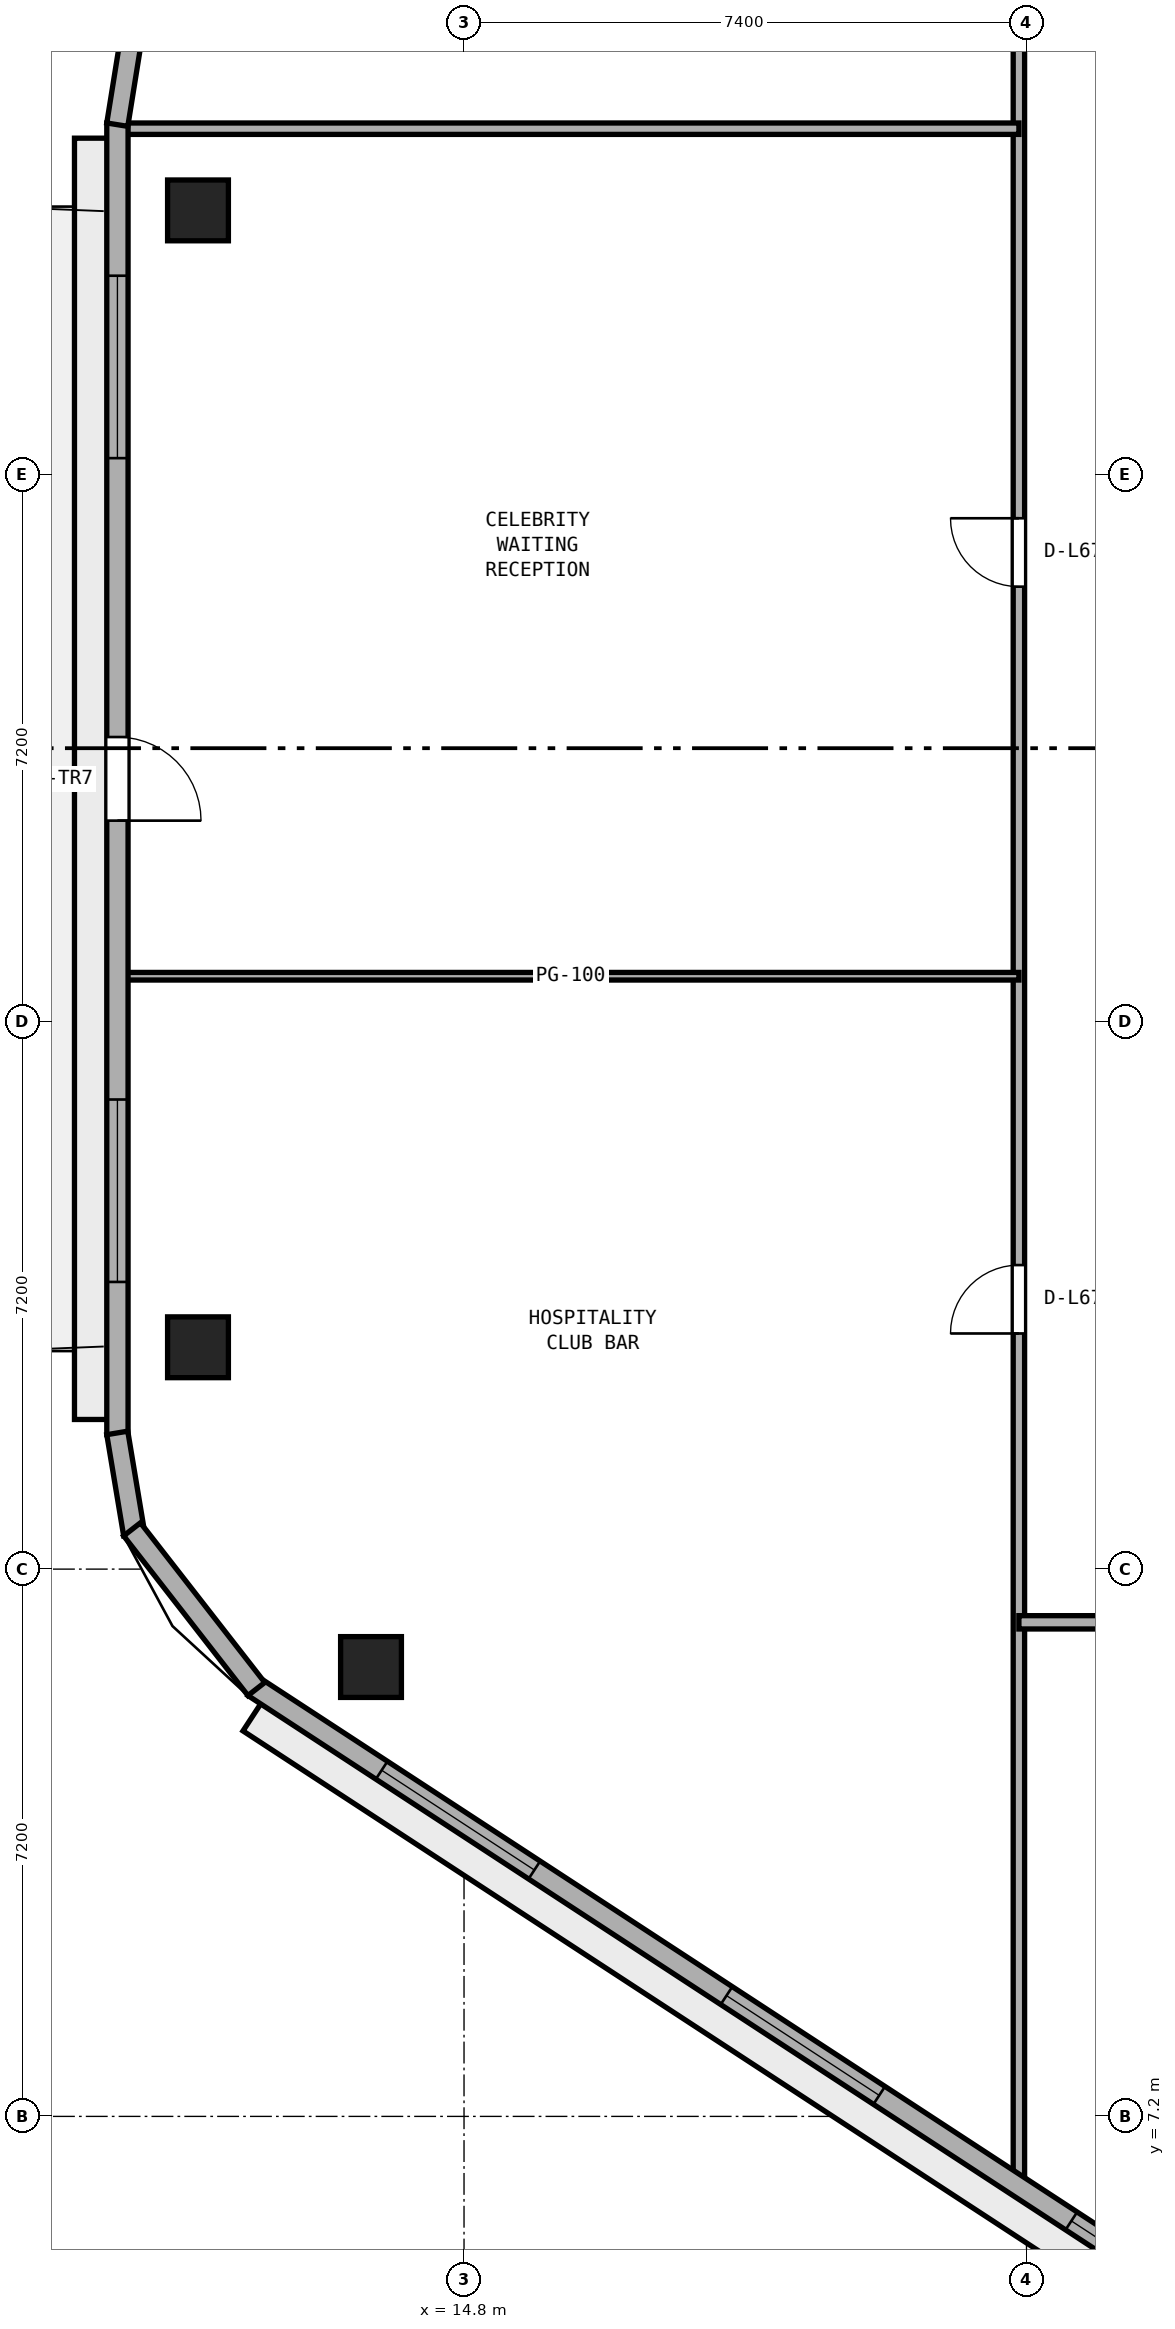
"""IFC4 building model, lengths in metres.
Left out: names, types, materials, properties, quantities, classifications, styles, units other than length and angle.
Written with IfcOpenShell. Run it as: python <this file> out.ifc"""

import sys

from ifc_helpers import new_model, si_unit, direction, frame, frame_2d, origin, origin_2d, place, context, subcontext, project, spatial, rectangle, extrude, element, fill, save


model = new_model("IFC4")
c1 = context("Model", 3, precision=1e-05, world=origin(), true_north=direction((0.0, 1.0)))
c2 = subcontext(c1, "Body", "Model", "MODEL_VIEW")
j1 = project(units=[si_unit("LENGTHUNIT", "METRE"), si_unit("PLANEANGLEUNIT", "RADIAN")], contexts=[c1])
p1 = place(None, origin())
s1 = spatial("IfcSite", under=j1, at=p1, CompositionType="ELEMENT")
p2 = place(p1, origin())
s2 = spatial("IfcBuilding", under=s1, at=p2, CompositionType="ELEMENT")
p3 = place(p2, frame((0.0, 0.0, 263.0)))
s3 = spatial("IfcBuildingStorey", under=s2, at=p3, CompositionType="ELEMENT", Elevation=263.0)
for number, where, z_axis, x_axis in (
    (1, (11.3, 32.275, 0.0), (0.0, 0.0, 1.0), (1.0, 0.0, 0.0)),
    (2, (11.3, 17.319, 0.0), (0.0, 0.0, 1.0), (1.0, 0.0, 0.0)),
    (3, (13.576, 13.112, 0.0), (0.0, 0.0, 1.0), (1.0, 0.0, 0.0)),
):
    element("IfcColumn", number, at=place(p3, frame(where, z_axis=z_axis, x_axis=x_axis)), inside=s3, PredefinedType="COLUMN", context=c2, shape_type="SweptSolid", body=[
        extrude(rectangle(XDim=0.8, YDim=0.8, at=origin_2d()), origin(), (0.0, 0.0, 1.0), 3.8),
    ])
p4 = place(p3, frame((22.1, 6.248, 0.0), z_axis=(0.0, 0.0, 1.0), x_axis=(0.0, 1.0, 0.0)))
e4 = element("IfcWall", 4, at=p4, inside=s3, PredefinedType="PARTITIONING", context=c2, shape_type="SweptSolid", body=[
    extrude(rectangle(XDim=30.452, YDim=0.15, at=frame_2d((15.226, 0.0))), origin(), (0.0, 0.0, 1.0), 3.51),
])
p5 = place(p4, frame((11.252, 0.0, 0.0)))
e5 = element("IfcOpeningElement", 5, at=p5, cuts=e4, PredefinedType="OPENING", context=c2, shape_type="SweptSolid", body=[
    extrude(rectangle(XDim=0.9, YDim=2.1, at=frame_2d((0.45, 1.05))), frame((0.0, 0.085, 0.0), z_axis=(0.0, -1.0, 0.0), x_axis=(1.0, 0.0, 0.0)), (0.0, 0.0, 1.0), 0.17),
])
p6 = place(p4, frame((21.077, 0.0, 0.0)))
e6 = element("IfcOpeningElement", 6, at=p6, cuts=e4, PredefinedType="OPENING", context=c2, shape_type="SweptSolid", body=[
    extrude(rectangle(XDim=0.9, YDim=2.1, at=frame_2d((0.45, 1.05))), frame((0.0, 0.085, 0.0), z_axis=(0.0, -1.0, 0.0), x_axis=(1.0, 0.0, 0.0)), (0.0, 0.0, 1.0), 0.17),
])
p7 = place(p3, frame((22.1, 13.7, 0.0), z_axis=(0.0, 0.0, 1.0), x_axis=(1.0, 0.0, 0.0)))
e7 = element("IfcWall", 7, at=p7, inside=s3, PredefinedType="PARTITIONING", context=c2, shape_type="SweptSolid", body=[
    extrude(rectangle(XDim=26.5, YDim=0.175, at=frame_2d((13.25, 0.0))), origin(), (0.0, 0.0, 1.0), 3.51),
])
p8 = place(p7, frame((7.12, 0.0, 0.0)))
e8 = element("IfcOpeningElement", 8, at=p8, cuts=e7, PredefinedType="OPENING", context=c2, shape_type="SweptSolid", body=[
    extrude(rectangle(XDim=0.9, YDim=2.1, at=frame_2d((0.45, 1.05))), frame((0.0, 0.097, 0.0), z_axis=(0.0, -1.0, 0.0), x_axis=(1.0, 0.0, 0.0)), (0.0, 0.0, 1.0), 0.195),
])
p9 = place(p7, frame((20.13, 0.0, 0.0)))
e9 = element("IfcOpeningElement", 9, at=p9, cuts=e7, PredefinedType="OPENING", context=c2, shape_type="SweptSolid", body=[
    extrude(rectangle(XDim=0.9, YDim=2.1, at=frame_2d((0.45, 1.05))), frame((0.0, 0.097, 0.0), z_axis=(0.0, -1.0, 0.0), x_axis=(1.0, 0.0, 0.0)), (0.0, 0.0, 1.0), 0.195),
])
p10 = place(p3, frame((10.305, 22.2, 0.0), z_axis=(0.0, 0.0, 1.0), x_axis=(1.0, 0.0, 0.0)))
e10 = element("IfcWall", 10, at=p10, inside=s3, PredefinedType="PARTITIONING", context=c2, shape_type="SweptSolid", body=[
    extrude(rectangle(XDim=11.795, YDim=0.1, at=frame_2d((5.897, 0.0))), origin(), (0.0, 0.0, 1.0), 3.51),
])
p11 = place(p3, frame((10.305, 33.35, 0.0), z_axis=(0.0, 0.0, 1.0), x_axis=(1.0, 0.0, 0.0)))
e11 = element("IfcWall", 11, at=p11, inside=s3, PredefinedType="PARTITIONING", context=c2, shape_type="SweptSolid", body=[
    extrude(rectangle(XDim=11.795, YDim=0.15, at=frame_2d((5.897, 0.0))), origin(), (0.0, 0.0, 1.0), 3.51),
])
p12 = place(p3, frame((10.24, 33.425, 0.0), z_axis=(0.0, 0.0, 1.0), x_axis=(0.0, -1.0, 0.0)))
e12 = element("IfcWall", 12, at=p12, inside=s3, PredefinedType="STANDARD", context=c2, shape_type="SweptSolid", body=[
    extrude(rectangle(XDim=17.257, YDim=0.28, at=frame_2d((8.628, 0.0))), origin(), (0.0, 0.0, 1.0), 3.51),
])
p13 = place(p12, frame((8.078, 0.0, 0.0)))
e13 = element("IfcOpeningElement", 13, at=p13, cuts=e12, PredefinedType="OPENING", context=c2, shape_type="SweptSolid", body=[
    extrude(rectangle(XDim=1.1, YDim=2.2, at=frame_2d((0.55, 1.1))), frame((0.0, 0.15, 0.0), z_axis=(0.0, -1.0, 0.0), x_axis=(1.0, 0.0, 0.0)), (0.0, 0.0, 1.0), 0.3),
])
p14 = place(p12, frame((2.01, 0.0, 0.9)))
e14 = element("IfcOpeningElement", 14, at=p14, cuts=e12, PredefinedType="OPENING", context=c2, shape_type="SweptSolid", body=[
    extrude(rectangle(XDim=2.4, YDim=1.75, at=frame_2d((1.2, 0.875))), frame((0.0, 0.15, 0.0), z_axis=(0.0, -1.0, 0.0), x_axis=(1.0, 0.0, 0.0)), (0.0, 0.0, 1.0), 0.3),
])
p15 = place(p12, frame((12.847, 0.0, 0.9)))
e15 = element("IfcOpeningElement", 15, at=p15, cuts=e12, PredefinedType="OPENING", context=c2, shape_type="SweptSolid", body=[
    extrude(rectangle(XDim=2.4, YDim=1.75, at=frame_2d((1.2, 0.875))), frame((0.0, 0.15, 0.0), z_axis=(0.0, -1.0, 0.0), x_axis=(1.0, 0.0, 0.0)), (0.0, 0.0, 1.0), 0.3),
])
p16 = place(p3, frame((12.034, 12.854, 0.0), z_axis=(0.0, 0.0, 1.0), x_axis=(0.837118352984, -0.547021812269, 0.0)))
e16 = element("IfcWall", 16, at=p16, inside=s3, PredefinedType="STANDARD", context=c2, shape_type="SweptSolid", body=[
    extrude(rectangle(XDim=17.259, YDim=0.28, at=frame_2d((8.63, 0.0))), origin(), (0.0, 0.0, 1.0), 3.51),
])
p17 = place(p16, frame((2.01, 0.0, 0.9)))
e17 = element("IfcOpeningElement", 17, at=p17, cuts=e16, PredefinedType="OPENING", context=c2, shape_type="SweptSolid", body=[
    extrude(rectangle(XDim=2.4, YDim=1.75, at=frame_2d((1.2, 0.875))), frame((0.0, 0.15, 0.0), z_axis=(0.0, -1.0, 0.0), x_axis=(1.0, 0.0, 0.0)), (0.0, 0.0, 1.0), 0.3),
])
p18 = place(p16, frame((7.43, 0.0, 0.9)))
e18 = element("IfcOpeningElement", 18, at=p18, cuts=e16, PredefinedType="OPENING", context=c2, shape_type="SweptSolid", body=[
    extrude(rectangle(XDim=2.4, YDim=1.75, at=frame_2d((1.2, 0.875))), frame((0.0, 0.15, 0.0), z_axis=(0.0, -1.0, 0.0), x_axis=(1.0, 0.0, 0.0)), (0.0, 0.0, 1.0), 0.3),
])
p19 = place(p16, frame((12.849, 0.0, 0.9)))
e19 = element("IfcOpeningElement", 19, at=p19, cuts=e16, PredefinedType="OPENING", context=c2, shape_type="SweptSolid", body=[
    extrude(rectangle(XDim=2.4, YDim=1.75, at=frame_2d((1.2, 0.875))), frame((0.0, 0.15, 0.0), z_axis=(0.0, -1.0, 0.0), x_axis=(1.0, 0.0, 0.0)), (0.0, 0.0, 1.0), 0.3),
])
p20 = place(p3, frame((10.445, 34.688, 0.0), z_axis=(0.0, 0.0, 1.0), x_axis=(-0.158524605336, -0.987355027081, 0.0)))
e20 = element("IfcWall", 20, at=p20, inside=s3, PredefinedType="STANDARD", context=c2, shape_type="SweptSolid", body=[
    extrude(rectangle(XDim=1.301, YDim=0.28, at=frame_2d((0.651, 0.0))), origin(), (0.0, 0.0, 1.0), 3.51),
])
p21 = place(p3, frame((10.238, 16.192, 0.0), z_axis=(0.0, 0.0, 1.0), x_axis=(0.164604311367, -0.986359681191, 0.0)))
e21 = element("IfcWall", 21, at=p21, inside=s3, PredefinedType="STANDARD", context=c2, shape_type="SweptSolid", body=[
    extrude(rectangle(XDim=1.35, YDim=0.28, at=frame_2d((0.675, 0.0))), origin(), (0.0, 0.0, 1.0), 3.51),
])
p22 = place(p3, frame((10.433, 14.923, 0.0), z_axis=(0.0, 0.0, 1.0), x_axis=(0.614181852676, -0.78916452774, 0.0)))
e22 = element("IfcWall", 22, at=p22, inside=s3, PredefinedType="STANDARD", context=c2, shape_type="SweptSolid", body=[
    extrude(rectangle(XDim=2.662, YDim=0.28, at=frame_2d((1.331, 0.0))), origin(), (0.0, 0.0, 1.0), 3.51),
])
p23 = place(p5, origin())
e23 = element("IfcDoor", 23, at=p23, inside=s3, OperationType="SINGLE_SWING_LEFT", PredefinedType="DOOR", context=c2, shape_type="SweptSolid", body=[
    extrude(rectangle(XDim=0.9, YDim=2.1, at=frame_2d((0.45, 1.05))), frame((0.0, 0.025, 0.0), z_axis=(0.0, -1.0, 0.0), x_axis=(1.0, 0.0, 0.0)), (0.0, 0.0, 1.0), 0.05),
])
fill(e5, e23)
p24 = place(p6, origin())
e24 = element("IfcDoor", 24, at=p24, inside=s3, OperationType="SINGLE_SWING_RIGHT", PredefinedType="DOOR", context=c2, shape_type="SweptSolid", body=[
    extrude(rectangle(XDim=0.9, YDim=2.1, at=frame_2d((0.45, 1.05))), frame((0.0, 0.025, 0.0), z_axis=(0.0, -1.0, 0.0), x_axis=(1.0, 0.0, 0.0)), (0.0, 0.0, 1.0), 0.05),
])
fill(e6, e24)
p25 = place(p13, origin())
e25 = element("IfcDoor", 25, at=p25, inside=s3, OperationType="SINGLE_SWING_RIGHT", PredefinedType="DOOR", context=c2, shape_type="SweptSolid", body=[
    extrude(rectangle(XDim=1.1, YDim=2.2, at=frame_2d((0.55, 1.1))), frame((0.0, 0.025, 0.0), z_axis=(0.0, -1.0, 0.0), x_axis=(1.0, 0.0, 0.0)), (0.0, 0.0, 1.0), 0.05),
])
fill(e13, e25)
p26 = place(p14, origin())
e26 = element("IfcWindow", 26, at=p26, inside=s3, PartitioningType="SINGLE_PANEL", PredefinedType="WINDOW", context=c2, shape_type="SweptSolid", body=[
    extrude(rectangle(XDim=2.4, YDim=1.75, at=frame_2d((1.2, 0.875))), frame((0.0, 0.03, 0.0), z_axis=(0.0, -1.0, 0.0), x_axis=(1.0, 0.0, 0.0)), (0.0, 0.0, 1.0), 0.06),
])
fill(e14, e26)
p27 = place(p15, origin())
e27 = element("IfcWindow", 27, at=p27, inside=s3, PartitioningType="SINGLE_PANEL", PredefinedType="WINDOW", context=c2, shape_type="SweptSolid", body=[
    extrude(rectangle(XDim=2.4, YDim=1.75, at=frame_2d((1.2, 0.875))), frame((0.0, 0.03, 0.0), z_axis=(0.0, -1.0, 0.0), x_axis=(1.0, 0.0, 0.0)), (0.0, 0.0, 1.0), 0.06),
])
fill(e15, e27)
p28 = place(p17, origin())
e28 = element("IfcWindow", 28, at=p28, inside=s3, PartitioningType="SINGLE_PANEL", PredefinedType="WINDOW", context=c2, shape_type="SweptSolid", body=[
    extrude(rectangle(XDim=2.4, YDim=1.75, at=frame_2d((1.2, 0.875))), frame((0.0, 0.03, 0.0), z_axis=(0.0, -1.0, 0.0), x_axis=(1.0, 0.0, 0.0)), (0.0, 0.0, 1.0), 0.06),
])
fill(e17, e28)
p29 = place(p18, origin())
e29 = element("IfcWindow", 29, at=p29, inside=s3, PartitioningType="SINGLE_PANEL", PredefinedType="WINDOW", context=c2, shape_type="SweptSolid", body=[
    extrude(rectangle(XDim=2.4, YDim=1.75, at=frame_2d((1.2, 0.875))), frame((0.0, 0.03, 0.0), z_axis=(0.0, -1.0, 0.0), x_axis=(1.0, 0.0, 0.0)), (0.0, 0.0, 1.0), 0.06),
])
fill(e18, e29)
p30 = place(p19, origin())
e30 = element("IfcWindow", 30, at=p30, inside=s3, PartitioningType="SINGLE_PANEL", PredefinedType="WINDOW", context=c2, shape_type="SweptSolid", body=[
    extrude(rectangle(XDim=2.4, YDim=1.75, at=frame_2d((1.2, 0.875))), frame((0.0, 0.03, 0.0), z_axis=(0.0, -1.0, 0.0), x_axis=(1.0, 0.0, 0.0)), (0.0, 0.0, 1.0), 0.06),
])
fill(e19, e30)
save(model, sys.argv[1])
